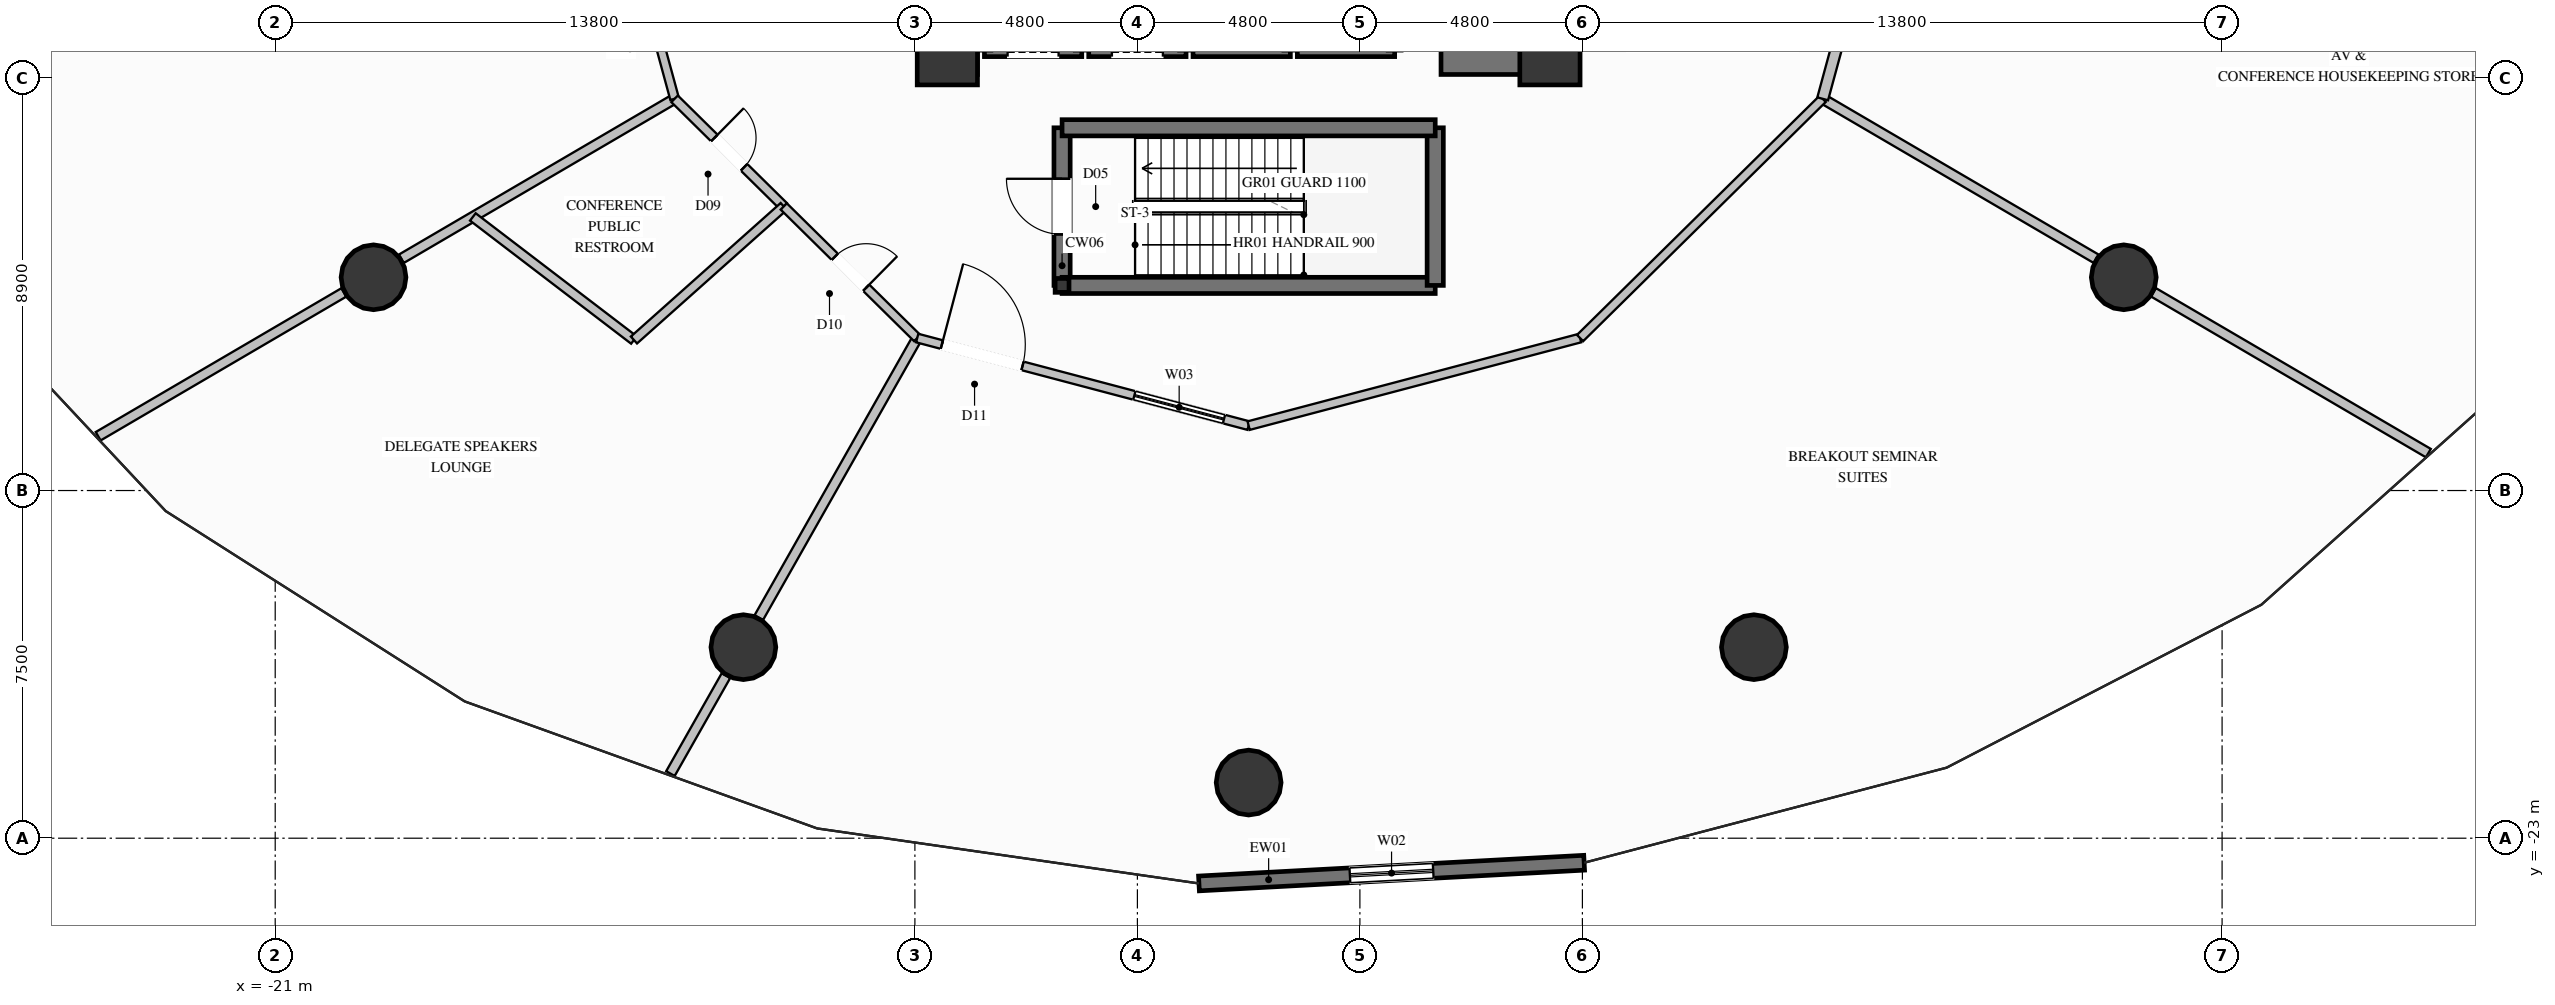
"""IFC4 building model, lengths in metres.
Left out: names, types, materials, properties, quantities, classifications, styles, units other than length and angle.
Written with IfcOpenShell. Run it as: python <this file> out.ifc"""

import sys

from ifc_helpers import new_model, si_unit, direction, frame, frame_2d, origin, origin_2d, place, context, subcontext, project, spatial, rectangle, hollow_rectangle, circle, extrude, element, fill, save


model = new_model("IFC4")
c1 = context("Model", 3, precision=1e-05, world=origin(), true_north=direction((0.0, 1.0)))
c2 = subcontext(c1, "Body", "Model", "MODEL_VIEW")
j1 = project(units=[si_unit("LENGTHUNIT", "METRE"), si_unit("PLANEANGLEUNIT", "RADIAN")], contexts=[c1])
p1 = place(None, origin())
s1 = spatial("IfcSite", under=j1, at=p1, CompositionType="ELEMENT")
p2 = place(p1, origin())
s2 = spatial("IfcBuilding", under=s1, at=p2, CompositionType="ELEMENT")
p3 = place(p2, frame((0.0, 0.0, 18.6)))
s3 = spatial("IfcBuildingStorey", under=s2, at=p3, CompositionType="ELEMENT", Elevation=18.6)
for number, where, z_axis, x_axis in (
    (1, (-6.5, -6.1, 0.0), (0.0, 0.0, 1.0), (1.0, 0.0, 0.0)),
    (2, (6.5, -6.1, 0.0), (0.0, 0.0, 1.0), (1.0, 0.0, 0.0)),
):
    element("IfcColumn", number, at=place(p3, frame(where, z_axis=z_axis, x_axis=x_axis)), inside=s3, PredefinedType="COLUMN", context=c2, shape_type="SweptSolid", body=[
        extrude(rectangle(XDim=1.3, YDim=1.3, at=origin_2d()), origin(), (0.0, 0.0, 1.0), 5.0),
    ])
p4 = place(p3, frame((-6.075, -6.1, 0.0), z_axis=(0.0, 0.0, 1.0), x_axis=(1.0, 0.0, 0.0)))
e3 = element("IfcWall", 3, at=p4, inside=s3, PredefinedType="SHEAR", context=c2, shape_type="SweptSolid", body=[
    extrude(rectangle(XDim=0.225, YDim=0.85, at=frame_2d((0.112, 0.0))), origin(), (0.0, 0.0, 1.0), 5.0),
])
p5 = place(p3, frame((4.15, -6.1, 0.0), z_axis=(0.0, 0.0, 1.0), x_axis=(1.0, 0.0, 0.0)))
e4 = element("IfcWall", 4, at=p5, inside=s3, PredefinedType="SHEAR", context=c2, shape_type="SweptSolid", body=[
    extrude(rectangle(XDim=1.925, YDim=0.85, at=frame_2d((0.962, 0.0))), origin(), (0.0, 0.0, 1.0), 5.0),
])
p6 = place(p3, frame((-6.5, -6.525, 0.0), z_axis=(0.0, 0.0, 1.0), x_axis=(0.0, 1.0, 0.0)))
e5 = element("IfcWall", 5, at=p6, inside=s3, PredefinedType="SHEAR", context=c2, shape_type="SweptSolid", body=[
    extrude(rectangle(XDim=3.175, YDim=0.85, at=frame_2d((1.587, 0.0))), origin(), (0.0, 0.0, 1.0), 5.0),
])
p7 = place(p3, frame((6.5, -6.525, 0.0), z_axis=(0.0, 0.0, 1.0), x_axis=(0.0, 1.0, 0.0)))
e6 = element("IfcWall", 6, at=p7, inside=s3, PredefinedType="SHEAR", context=c2, shape_type="SweptSolid", body=[
    extrude(rectangle(XDim=4.175, YDim=0.85, at=frame_2d((2.087, 0.0))), origin(), (0.0, 0.0, 1.0), 5.0),
])
p8 = place(p3, frame((-4.025, -11.075, 0.0), z_axis=(0.0, 0.0, 1.0), x_axis=(1.0, 0.0, 0.0)))
e7 = element("IfcColumn", 7, at=p8, inside=s3, PredefinedType="COLUMN", context=c2, shape_type="SweptSolid", body=[
    extrude(hollow_rectangle(XDim=0.3, YDim=0.3, WallThickness=0.016, at=origin_2d()), origin(), (0.0, 0.0, 1.0), 5.0),
])
for number, where, z_axis, x_axis in (
    (8, (-18.879, -10.9, 0.0), (0.0, 0.0, 1.0), (1.0, 0.0, 0.0)),
    (9, (-10.9, -18.879, 0.0), (0.0, 0.0, 1.0), (1.0, 0.0, 0.0)),
    (10, (0.0, -21.8, 0.0), (0.0, 0.0, 1.0), (1.0, 0.0, 0.0)),
    (11, (10.9, -18.879, 0.0), (0.0, 0.0, 1.0), (1.0, 0.0, 0.0)),
    (12, (18.879, -10.9, 0.0), (0.0, 0.0, 1.0), (1.0, 0.0, 0.0)),
):
    element("IfcColumn", number, at=place(p3, frame(where, z_axis=z_axis, x_axis=x_axis)), inside=s3, PredefinedType="COLUMN", context=c2, shape_type="SweptSolid", body=[
        extrude(circle(Radius=0.7, at=origin_2d()), origin(), (0.0, 0.0, 1.0), 5.0),
    ])
p9 = place(p3, frame((7.238, -23.529, 0.0), z_axis=(0.0, 0.0, 1.0), x_axis=(-0.998556298709, -0.053715159026, 0.0)))
e13 = element("IfcWall", 13, at=p9, inside=s3, PredefinedType="SOLIDWALL", context=c2, shape_type="SweptSolid", body=[
    extrude(rectangle(XDim=8.322, YDim=0.32, at=frame_2d((4.161, 0.0))), origin(), (0.0, 0.0, 1.0), 4.64),
])
p10 = place(p9, frame((3.261, 0.0, 0.65)))
e14 = element("IfcOpeningElement", 14, at=p10, cuts=e13, PredefinedType="OPENING", context=c2, shape_type="SweptSolid", body=[
    extrude(rectangle(XDim=1.8, YDim=2.6, at=frame_2d((0.9, 1.3))), frame((0.0, 0.17, 0.0), z_axis=(0.0, -1.0, 0.0), x_axis=(1.0, 0.0, 0.0)), (0.0, 0.0, 1.0), 0.34),
])
p11 = place(p3, frame((-5.7, -6.0, 0.0), z_axis=(0.0, 0.0, 1.0), x_axis=(1.0, 0.0, 0.0)))
e15 = element("IfcWall", 15, at=p11, inside=s3, PredefinedType="SOLIDWALL", context=c2, shape_type="SweptSolid", body=[
    extrude(rectangle(XDim=2.1, YDim=0.28, at=frame_2d((1.05, 0.0))), origin(), (0.0, 0.0, 1.0), 4.64),
])
p12 = place(p11, frame((0.5, 0.0, 0.0)))
e16 = element("IfcOpeningElement", 16, at=p12, cuts=e15, PredefinedType="OPENING", context=c2, shape_type="SweptSolid", body=[
    extrude(rectangle(XDim=1.1, YDim=2.2, at=frame_2d((0.55, 1.1))), frame((0.0, 0.15, 0.0), z_axis=(0.0, -1.0, 0.0), x_axis=(1.0, 0.0, 0.0)), (0.0, 0.0, 1.0), 0.3),
])
p13 = place(p3, frame((-3.45, -6.0, 0.0), z_axis=(0.0, 0.0, 1.0), x_axis=(1.0, 0.0, 0.0)))
e17 = element("IfcWall", 17, at=p13, inside=s3, PredefinedType="SOLIDWALL", context=c2, shape_type="SweptSolid", body=[
    extrude(rectangle(XDim=2.1, YDim=0.28, at=frame_2d((1.05, 0.0))), origin(), (0.0, 0.0, 1.0), 4.64),
])
p14 = place(p13, frame((0.5, 0.0, 0.0)))
e18 = element("IfcOpeningElement", 18, at=p14, cuts=e17, PredefinedType="OPENING", context=c2, shape_type="SweptSolid", body=[
    extrude(rectangle(XDim=1.1, YDim=2.2, at=frame_2d((0.55, 1.1))), frame((0.0, 0.15, 0.0), z_axis=(0.0, -1.0, 0.0), x_axis=(1.0, 0.0, 0.0)), (0.0, 0.0, 1.0), 0.3),
])
for number, where, z_axis, x_axis in (
    (19, (-1.2, -6.0, 0.0), (0.0, 0.0, 1.0), (1.0, 0.0, 0.0)),
    (20, (1.05, -6.0, 0.0), (0.0, 0.0, 1.0), (1.0, 0.0, 0.0)),
):
    element("IfcWall", number, at=place(p3, frame(where, z_axis=z_axis, x_axis=x_axis)), inside=s3, PredefinedType="SOLIDWALL", context=c2, shape_type="SweptSolid", body=[
        extrude(rectangle(XDim=2.1, YDim=0.28, at=frame_2d((1.05, 0.0))), origin(), (0.0, 0.0, 1.0), 4.64),
    ])
p15 = place(p3, frame((-4.025, -11.075, 0.0), z_axis=(0.0, 0.0, 1.0), x_axis=(0.0, 1.0, 0.0)))
e21 = element("IfcWall", 21, at=p15, inside=s3, PredefinedType="SOLIDWALL", context=c2, shape_type="SweptSolid", body=[
    extrude(rectangle(XDim=3.4, YDim=0.35, at=frame_2d((1.7, 0.0))), origin(), (0.0, 0.0, 1.0), 4.64),
])
p16 = place(p15, frame((1.1, 0.0, 0.0)))
e22 = element("IfcOpeningElement", 22, at=p16, cuts=e21, PredefinedType="OPENING", context=c2, shape_type="SweptSolid", body=[
    extrude(rectangle(XDim=1.2, YDim=2.2, at=frame_2d((0.6, 1.1))), frame((0.0, 0.185, 0.0), z_axis=(0.0, -1.0, 0.0), x_axis=(1.0, 0.0, 0.0)), (0.0, 0.0, 1.0), 0.37),
])
p17 = place(p3, frame((-4.025, -11.075, 0.0), z_axis=(0.0, 0.0, 1.0), x_axis=(1.0, 0.0, 0.0)))
e23 = element("IfcWall", 23, at=p17, inside=s3, PredefinedType="SOLIDWALL", context=c2, shape_type="SweptSolid", body=[
    extrude(rectangle(XDim=8.05, YDim=0.35, at=frame_2d((4.025, 0.0))), origin(), (0.0, 0.0, 1.0), 4.64),
])
p18 = place(p3, frame((4.025, -11.075, 0.0), z_axis=(0.0, 0.0, 1.0), x_axis=(0.0, 1.0, 0.0)))
e24 = element("IfcWall", 24, at=p18, inside=s3, PredefinedType="SOLIDWALL", context=c2, shape_type="SweptSolid", body=[
    extrude(rectangle(XDim=3.4, YDim=0.35, at=frame_2d((1.7, 0.0))), origin(), (0.0, 0.0, 1.0), 4.64),
])
p19 = place(p3, frame((4.025, -7.675, 0.0), z_axis=(0.0, 0.0, 1.0), x_axis=(-1.0, 0.0, 0.0)))
e25 = element("IfcWall", 25, at=p19, inside=s3, PredefinedType="SOLIDWALL", context=c2, shape_type="SweptSolid", body=[
    extrude(rectangle(XDim=8.05, YDim=0.35, at=frame_2d((4.025, 0.0))), origin(), (0.0, 0.0, 1.0), 4.64),
])
p20 = place(p3, frame((-12.384, -7.05, 0.0), z_axis=(0.0, 0.0, 1.0), x_axis=(-0.863039168853, -0.505137004213, 0.0)))
e26 = element("IfcWall", 26, at=p20, inside=s3, PredefinedType="PARTITIONING", context=c2, shape_type="SweptSolid", body=[
    extrude(rectangle(XDim=6.832, YDim=0.21, at=frame_2d((3.416, 0.0))), origin(), (0.0, 0.0, 1.0), 3.929),
])
p21 = place(p3, frame((-19.52, -11.227, 0.0), z_axis=(0.0, 0.0, 1.0), x_axis=(-0.863003476407, -0.505197980706, 0.0)))
e27 = element("IfcWall", 27, at=p21, inside=s3, PredefinedType="PARTITIONING", context=c2, shape_type="SweptSolid", body=[
    extrude(rectangle(XDim=6.14, YDim=0.21, at=frame_2d((3.07, 0.0))), origin(), (0.0, 0.0, 1.0), 4.64),
])
p22 = place(p3, frame((-7.15, -12.211, 0.0), z_axis=(0.0, 0.0, 1.0), x_axis=(-0.493009905658, -0.87002369676, 0.0)))
e28 = element("IfcWall", 28, at=p22, inside=s3, PredefinedType="PARTITIONING", context=c2, shape_type="SweptSolid", body=[
    extrude(rectangle(XDim=6.931, YDim=0.21, at=frame_2d((3.465, 0.0))), origin(), (0.0, 0.0, 1.0), 3.929),
])
p23 = place(p3, frame((-11.276, -19.493, 0.0), z_axis=(0.0, 0.0, 1.0), x_axis=(-0.493278815441, -0.869871260726, 0.0)))
e29 = element("IfcWall", 29, at=p23, inside=s3, PredefinedType="PARTITIONING", context=c2, shape_type="SweptSolid", body=[
    extrude(rectangle(XDim=2.429, YDim=0.21, at=frame_2d((1.215, 0.0))), origin(), (0.0, 0.0, 1.0), 4.64),
])
p24 = place(p3, frame((12.384, -7.05, 0.0), z_axis=(0.0, 0.0, 1.0), x_axis=(0.863200238908, -0.504861711313, 0.0)))
e30 = element("IfcWall", 30, at=p24, inside=s3, PredefinedType="PARTITIONING", context=c2, shape_type="SweptSolid", body=[
    extrude(rectangle(XDim=6.832, YDim=0.21, at=frame_2d((3.416, 0.0))), origin(), (0.0, 0.0, 1.0), 3.929),
])
p25 = place(p3, frame((19.521, -11.225, 0.0), z_axis=(0.0, 0.0, 1.0), x_axis=(0.863178834924, -0.504898305542, 0.0)))
e31 = element("IfcWall", 31, at=p25, inside=s3, PredefinedType="PARTITIONING", context=c2, shape_type="SweptSolid", body=[
    extrude(rectangle(XDim=6.869, YDim=0.21, at=frame_2d((3.434, 0.0))), origin(), (0.0, 0.0, 1.0), 4.64),
])
p26 = place(p3, frame((-13.438, -3.172, 0.0), z_axis=(0.0, 0.0, 1.0), x_axis=(0.262269103922, -0.9649947757, 0.0)))
e32 = element("IfcWall", 32, at=p26, inside=s3, PredefinedType="PARTITIONING", context=c2, shape_type="SweptSolid", body=[
    extrude(rectangle(XDim=4.019, YDim=0.19, at=frame_2d((2.009, 0.0))), origin(), (0.0, 0.0, 1.0), 4.64),
])
p27 = place(p26, frame((1.534, 0.0, 0.0)))
e33 = element("IfcOpeningElement", 33, at=p27, cuts=e32, PredefinedType="OPENING", context=c2, shape_type="SweptSolid", body=[
    extrude(rectangle(XDim=0.95, YDim=2.1, at=frame_2d((0.475, 1.05))), frame((0.0, 0.105, 0.0), z_axis=(0.0, -1.0, 0.0), x_axis=(1.0, 0.0, 0.0)), (0.0, 0.0, 1.0), 0.21),
])
p28 = place(p3, frame((-12.384, -7.05, 0.0), z_axis=(0.0, 0.0, 1.0), x_axis=(0.712072104827, -0.70210634346, 0.0)))
e34 = element("IfcWall", 34, at=p28, inside=s3, PredefinedType="PLUMBINGWALL", context=c2, shape_type="SweptSolid", body=[
    extrude(rectangle(XDim=3.307, YDim=0.2, at=frame_2d((1.654, 0.0))), origin(), (0.0, 0.0, 1.0), 4.64),
])
p29 = place(p28, frame((1.204, 0.0, 0.0)))
e35 = element("IfcOpeningElement", 35, at=p29, cuts=e34, PredefinedType="OPENING", context=c2, shape_type="SweptSolid", body=[
    extrude(rectangle(XDim=0.9, YDim=2.1, at=frame_2d((0.45, 1.05))), frame((0.0, 0.11, 0.0), z_axis=(0.0, -1.0, 0.0), x_axis=(1.0, 0.0, 0.0)), (0.0, 0.0, 1.0), 0.22),
])
p30 = place(p3, frame((-16.736, -9.598, 0.0), z_axis=(0.0, 0.0, 1.0), x_axis=(0.794622380962, -0.607104004002, 0.0)))
e36 = element("IfcWall", 36, at=p30, inside=s3, PredefinedType="PLUMBINGWALL", context=c2, shape_type="SweptSolid", body=[
    extrude(rectangle(XDim=4.373, YDim=0.2, at=frame_2d((2.187, 0.0))), origin(), (0.0, 0.0, 1.0), 4.64),
])
p31 = place(p3, frame((-10.029, -9.372, 0.0), z_axis=(0.0, 0.0, 1.0), x_axis=(-0.746487697468, -0.665399216658, 0.0)))
e37 = element("IfcWall", 37, at=p31, inside=s3, PredefinedType="PLUMBINGWALL", context=c2, shape_type="SweptSolid", body=[
    extrude(rectangle(XDim=4.33, YDim=0.2, at=frame_2d((2.165, 0.0))), origin(), (0.0, 0.0, 1.0), 4.64),
])
p32 = place(p3, frame((-10.029, -9.372, 0.0), z_axis=(0.0, 0.0, 1.0), x_axis=(0.712070649597, -0.702107819343, 0.0)))
e38 = element("IfcWall", 38, at=p32, inside=s3, PredefinedType="PARTITIONING", context=c2, shape_type="SweptSolid", body=[
    extrude(rectangle(XDim=4.043, YDim=0.19, at=frame_2d((2.022, 0.0))), origin(), (0.0, 0.0, 1.0), 4.64),
])
p33 = place(p32, frame((1.547, 0.0, 0.0)))
e39 = element("IfcOpeningElement", 39, at=p33, cuts=e38, PredefinedType="OPENING", context=c2, shape_type="SweptSolid", body=[
    extrude(rectangle(XDim=0.95, YDim=2.1, at=frame_2d((0.475, 1.05))), frame((0.0, 0.105, 0.0), z_axis=(0.0, -1.0, 0.0), x_axis=(1.0, 0.0, 0.0)), (0.0, 0.0, 1.0), 0.21),
])
p34 = place(p3, frame((-7.15, -12.211, 0.0), z_axis=(0.0, 0.0, 1.0), x_axis=(0.966820901533, -0.255455170937, 0.0)))
e40 = element("IfcWall", 40, at=p34, inside=s3, PredefinedType="PARTITIONING", context=c2, shape_type="SweptSolid", body=[
    extrude(rectangle(XDim=7.395, YDim=0.19, at=frame_2d((3.698, 0.0))), origin(), (0.0, 0.0, 1.0), 4.219),
])
p35 = place(p34, frame((0.55, 0.0, 0.0)))
e41 = element("IfcOpeningElement", 41, at=p35, cuts=e40, PredefinedType="OPENING", context=c2, shape_type="SweptSolid", body=[
    extrude(rectangle(XDim=1.8, YDim=2.4, at=frame_2d((0.9, 1.2))), frame((0.0, 0.105, 0.0), z_axis=(0.0, -1.0, 0.0), x_axis=(1.0, 0.0, 0.0)), (0.0, 0.0, 1.0), 0.21),
])
p36 = place(p34, frame((4.845, 0.0, 0.9)))
e42 = element("IfcOpeningElement", 42, at=p36, cuts=e40, PredefinedType="OPENING", context=c2, shape_type="SweptSolid", body=[
    extrude(rectangle(XDim=2.0, YDim=1.6, at=frame_2d((1.0, 0.8))), frame((0.0, 0.105, 0.0), z_axis=(0.0, -1.0, 0.0), x_axis=(1.0, 0.0, 0.0)), (0.0, 0.0, 1.0), 0.21),
])
p37 = place(p3, frame((0.0, -14.1, 0.0), z_axis=(0.0, 0.0, 1.0), x_axis=(0.966820901533, 0.255455170937, 0.0)))
e43 = element("IfcWall", 43, at=p37, inside=s3, PredefinedType="PARTITIONING", context=c2, shape_type="SweptSolid", body=[
    extrude(rectangle(XDim=7.395, YDim=0.19, at=frame_2d((3.698, 0.0))), origin(), (0.0, 0.0, 1.0), 4.219),
])
p38 = place(p3, frame((7.15, -12.211, 0.0), z_axis=(0.0, 0.0, 1.0), x_axis=(0.712071304345, 0.702107155303, 0.0)))
e44 = element("IfcWall", 44, at=p38, inside=s3, PredefinedType="PARTITIONING", context=c2, shape_type="SweptSolid", body=[
    extrude(rectangle(XDim=7.351, YDim=0.19, at=frame_2d((3.675, 0.0))), origin(), (0.0, 0.0, 1.0), 4.64),
])
p39 = place(p3, frame((12.384, -7.05, 0.0), z_axis=(0.0, 0.0, 1.0), x_axis=(0.262260528785, 0.964997106235, 0.0)))
e45 = element("IfcWall", 45, at=p39, inside=s3, PredefinedType="PARTITIONING", context=c2, shape_type="SweptSolid", body=[
    extrude(rectangle(XDim=7.306, YDim=0.24, at=frame_2d((3.653, 0.0))), origin(), (0.0, 0.0, 1.0), 4.219),
])
p40 = place(p39, frame((3.178, 0.0, 0.0)))
e46 = element("IfcOpeningElement", 46, at=p40, cuts=e45, PredefinedType="OPENING", context=c2, shape_type="SweptSolid", body=[
    extrude(rectangle(XDim=0.95, YDim=2.1, at=frame_2d((0.475, 1.05))), frame((0.0, 0.13, 0.0), z_axis=(0.0, -1.0, 0.0), x_axis=(1.0, 0.0, 0.0)), (0.0, 0.0, 1.0), 0.26),
])
p41 = place(p10, origin())
e47 = element("IfcWindow", 47, at=p41, inside=s3, PartitioningType="SINGLE_PANEL", PredefinedType="WINDOW", context=c2, shape_type="SweptSolid", body=[
    extrude(rectangle(XDim=1.8, YDim=2.6, at=frame_2d((0.9, 1.3))), frame((0.0, 0.03, 0.0), z_axis=(0.0, -1.0, 0.0), x_axis=(1.0, 0.0, 0.0)), (0.0, 0.0, 1.0), 0.06),
])
fill(e14, e47)
p42 = place(p16, origin())
e48 = element("IfcDoor", 48, at=p42, inside=s3, OperationType="SINGLE_SWING_RIGHT", PredefinedType="DOOR", context=c2, shape_type="SweptSolid", body=[
    extrude(rectangle(XDim=1.2, YDim=2.2, at=frame_2d((0.6, 1.1))), frame((0.0, 0.025, 0.0), z_axis=(0.0, -1.0, 0.0), x_axis=(1.0, 0.0, 0.0)), (0.0, 0.0, 1.0), 0.05),
])
fill(e22, e48)
p43 = place(p29, origin())
e49 = element("IfcDoor", 49, at=p43, inside=s3, OperationType="SINGLE_SWING_LEFT", PredefinedType="DOOR", context=c2, shape_type="SweptSolid", body=[
    extrude(rectangle(XDim=0.9, YDim=2.1, at=frame_2d((0.45, 1.05))), frame((0.0, 0.025, 0.0), z_axis=(0.0, -1.0, 0.0), x_axis=(1.0, 0.0, 0.0)), (0.0, 0.0, 1.0), 0.05),
])
fill(e35, e49)
p44 = place(p33, origin())
e50 = element("IfcDoor", 50, at=p44, inside=s3, OperationType="SINGLE_SWING_RIGHT", PredefinedType="DOOR", context=c2, shape_type="SweptSolid", body=[
    extrude(rectangle(XDim=0.95, YDim=2.1, at=frame_2d((0.475, 1.05))), frame((0.0, 0.025, 0.0), z_axis=(0.0, -1.0, 0.0), x_axis=(1.0, 0.0, 0.0)), (0.0, 0.0, 1.0), 0.05),
])
fill(e39, e50)
p45 = place(p35, origin())
e51 = element("IfcDoor", 51, at=p45, inside=s3, OperationType="SINGLE_SWING_LEFT", PredefinedType="DOOR", context=c2, shape_type="SweptSolid", body=[
    extrude(rectangle(XDim=1.8, YDim=2.4, at=frame_2d((0.9, 1.2))), frame((0.0, 0.025, 0.0), z_axis=(0.0, -1.0, 0.0), x_axis=(1.0, 0.0, 0.0)), (0.0, 0.0, 1.0), 0.05),
])
fill(e41, e51)
p46 = place(p36, origin())
e52 = element("IfcWindow", 52, at=p46, inside=s3, PartitioningType="SINGLE_PANEL", PredefinedType="WINDOW", context=c2, shape_type="SweptSolid", body=[
    extrude(rectangle(XDim=2.0, YDim=1.6, at=frame_2d((1.0, 0.8))), frame((0.0, 0.03, 0.0), z_axis=(0.0, -1.0, 0.0), x_axis=(1.0, 0.0, 0.0)), (0.0, 0.0, 1.0), 0.06),
])
fill(e42, e52)
save(model, sys.argv[1])
